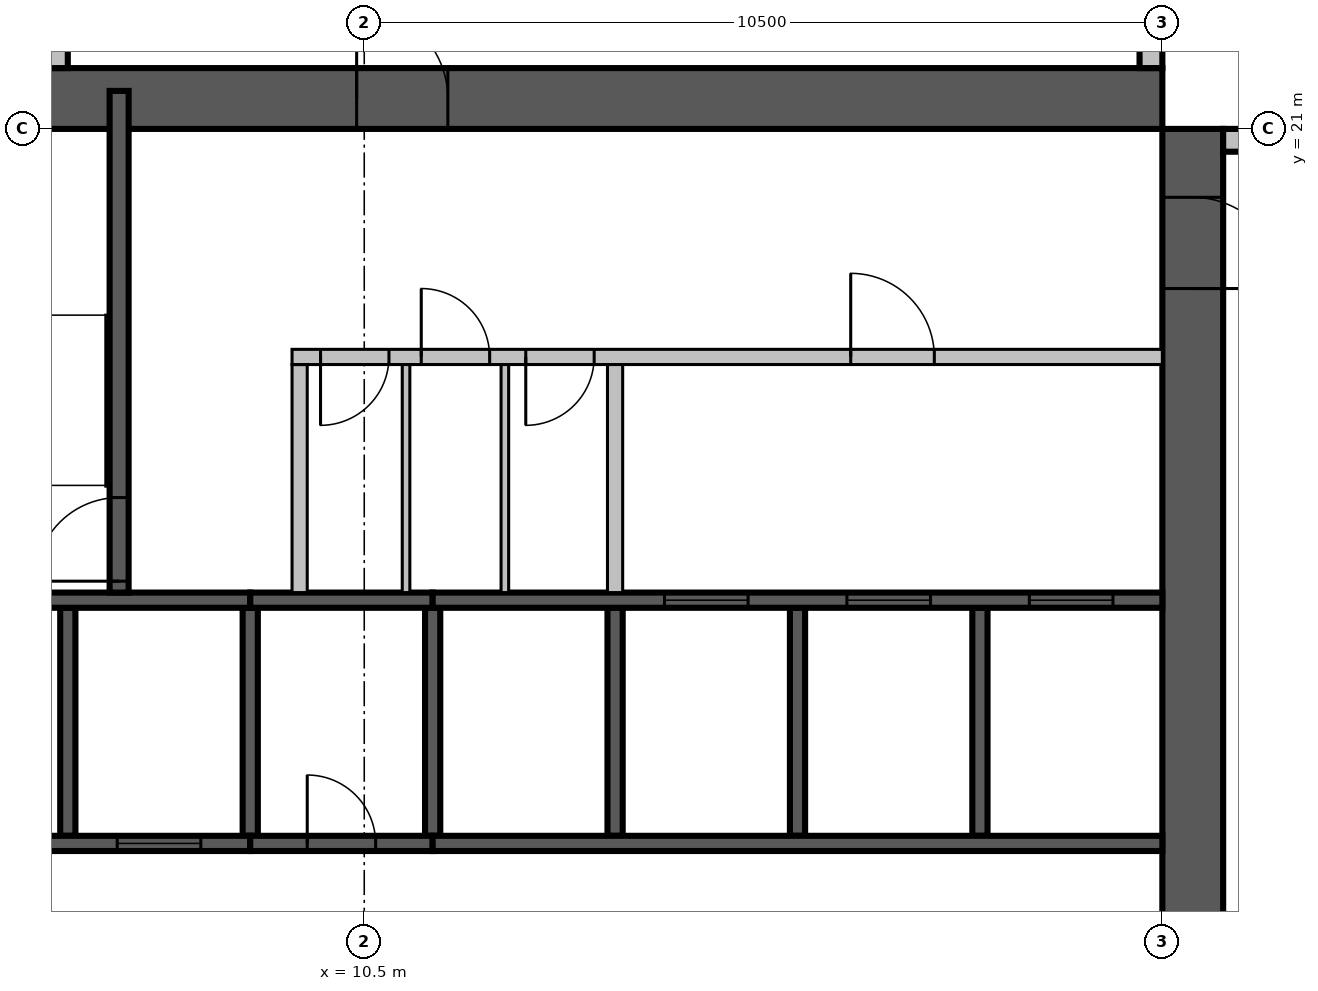
"""IFC4 building model, lengths in metres.
Left out: names, types, materials, properties, quantities, classifications, styles, units other than length and angle.
Written with IfcOpenShell. Run it as: python <this file> out.ifc"""

import sys

from ifc_helpers import new_model, si_unit, direction, frame, frame_2d, origin, place, context, subcontext, project, spatial, rectangle, extrude, source, transform, mapped, element, fill, save


model = new_model("IFC4")
c1 = context("Model", 3, precision=1e-05, world=origin(), true_north=direction((0.0, 1.0)))
c2 = subcontext(c1, "Body", "Model", "MODEL_VIEW")
j1 = project(units=[si_unit("LENGTHUNIT", "METRE"), si_unit("PLANEANGLEUNIT", "RADIAN")], contexts=[c1])
p1 = place(None, origin())
s1 = spatial("IfcSite", under=j1, at=p1, CompositionType="ELEMENT")
p2 = place(p1, origin())
s2 = spatial("IfcBuilding", under=s1, at=p2, CompositionType="ELEMENT")
p3 = place(p2, frame((0.0, 0.0, 265.2)))
s3 = spatial("IfcBuildingStorey", under=s2, at=p3, CompositionType="ELEMENT", Elevation=265.2)
m1 = source(origin(), c2, "Body", "SweptSolid", [
    extrude(rectangle(XDim=16.8, YDim=0.8, at=frame_2d((8.4, 0.0))), origin(), (0.0, 0.0, 1.0), 3.8),
])
p4 = place(p3, frame((21.4, 4.2, 0.0), z_axis=(0.0, 0.0, 1.0), x_axis=(0.0, 1.0, 0.0)))
e1 = element("IfcWall", 1, at=p4, inside=s3, PredefinedType="SHEAR", context=c2, shape_type="MappedRepresentation", body=[
    mapped(m1, transform((0.0, 0.0, 0.0), scale=1.0)),
])
m2 = source(origin(), c2, "Body", "SweptSolid", [
    extrude(rectangle(XDim=2.2, YDim=2.1, at=frame_2d((1.1, 1.05))), frame((0.0, 0.41, 0.0), z_axis=(0.0, -1.0, 0.0), x_axis=(1.0, 0.0, 0.0)), (0.0, 0.0, 1.0), 0.82),
])
p5 = place(p4, frame((4.2, 0.0, 0.0)))
e2 = element("IfcOpeningElement", 2, at=p5, cuts=e1, PredefinedType="OPENING", context=c2, shape_type="MappedRepresentation", body=[
    mapped(m2, transform((0.0, 0.0, 0.0), scale=1.0)),
])
m3 = source(origin(), c2, "Body", "SweptSolid", [
    extrude(rectangle(XDim=1.2, YDim=2.1, at=frame_2d((0.6, 1.05))), frame((0.0, 0.41, 0.0), z_axis=(0.0, -1.0, 0.0), x_axis=(1.0, 0.0, 0.0)), (0.0, 0.0, 1.0), 0.82),
])
p6 = place(p4, frame((14.7, 0.0, 0.0)))
e3 = element("IfcOpeningElement", 3, at=p6, cuts=e1, PredefinedType="OPENING", context=c2, shape_type="MappedRepresentation", body=[
    mapped(m3, transform((0.0, 0.0, 0.0), scale=1.0)),
])
p7 = place(p3, frame((4.2, 21.4, 0.0), z_axis=(0.0, 0.0, 1.0), x_axis=(1.0, 0.0, 0.0)))
e4 = element("IfcWall", 4, at=p7, inside=s3, PredefinedType="SHEAR", context=c2, shape_type="MappedRepresentation", body=[
    mapped(m1, transform((0.0, 0.0, 0.0), scale=1.0)),
])
p8 = place(p7, frame((6.2, 0.0, 0.0)))
e5 = element("IfcOpeningElement", 5, at=p8, cuts=e4, PredefinedType="OPENING", context=c2, shape_type="MappedRepresentation", body=[
    mapped(m3, transform((0.0, 0.0, 0.0), scale=1.0)),
])
m4 = source(origin(), c2, "Body", "SweptSolid", [
    extrude(rectangle(XDim=7.2, YDim=0.3, at=frame_2d((3.6, 0.0))), origin(), (0.0, 0.0, 1.0), 3.4),
])
p9 = place(p3, frame((29.0, 20.85, 0.0), z_axis=(0.0, 0.0, 1.0), x_axis=(-1.0, 0.0, 0.0)))
e6 = element("IfcWall", 6, at=p9, inside=s3, PredefinedType="STANDARD", context=c2, shape_type="MappedRepresentation", body=[
    mapped(m4, transform((0.0, 0.0, 0.0), scale=1.0)),
])
m5 = source(origin(), c2, "Body", "SweptSolid", [
    extrude(rectangle(XDim=1.8, YDim=2.3, at=frame_2d((0.9, 1.15))), frame((0.0, 0.16, 0.0), z_axis=(0.0, -1.0, 0.0), x_axis=(1.0, 0.0, 0.0)), (0.0, 0.0, 1.0), 0.32),
])
p10 = place(p9, frame((0.613, 0.0, 0.6)))
e7 = element("IfcOpeningElement", 7, at=p10, cuts=e6, PredefinedType="OPENING", context=c2, shape_type="MappedRepresentation", body=[
    mapped(m5, transform((0.0, 0.0, 0.0), scale=1.0)),
])
p11 = place(p9, frame((5.0, 0.0, 0.6)))
e8 = element("IfcOpeningElement", 8, at=p11, cuts=e6, PredefinedType="OPENING", context=c2, shape_type="MappedRepresentation", body=[
    mapped(m5, transform((0.0, 0.0, 0.0), scale=1.0)),
])
p12 = place(p3, frame((20.85, 21.8, 0.0), z_axis=(0.0, 0.0, 1.0), x_axis=(0.0, 1.0, 0.0)))
e9 = element("IfcWall", 9, at=p12, inside=s3, PredefinedType="STANDARD", context=c2, shape_type="MappedRepresentation", body=[
    mapped(m4, transform((0.0, 0.0, 0.0), scale=1.0)),
])
p13 = place(p12, frame((0.4, 0.0, 0.6)))
e10 = element("IfcOpeningElement", 10, at=p13, cuts=e9, PredefinedType="OPENING", context=c2, shape_type="MappedRepresentation", body=[
    mapped(m5, transform((0.0, 0.0, 0.0), scale=1.0)),
])
p14 = place(p12, frame((4.787, 0.0, 0.6)))
e11 = element("IfcOpeningElement", 11, at=p14, cuts=e9, PredefinedType="OPENING", context=c2, shape_type="MappedRepresentation", body=[
    mapped(m5, transform((0.0, 0.0, 0.0), scale=1.0)),
])
m6 = source(origin(), c2, "Body", "SweptSolid", [
    extrude(rectangle(XDim=16.6, YDim=0.3, at=frame_2d((8.3, 0.0))), origin(), (0.0, 0.0, 1.0), 3.4),
])
p15 = place(p3, frame((6.45, 38.4, 0.0), z_axis=(0.0, 0.0, 1.0), x_axis=(0.0, -1.0, 0.0)))
e12 = element("IfcWall", 12, at=p15, inside=s3, PredefinedType="STANDARD", context=c2, shape_type="MappedRepresentation", body=[
    mapped(m6, transform((0.0, 0.0, 0.0), scale=1.0)),
])
p16 = place(p15, frame((1.15, 0.0, 0.6)))
e13 = element("IfcOpeningElement", 13, at=p16, cuts=e12, PredefinedType="OPENING", context=c2, shape_type="MappedRepresentation", body=[
    mapped(m5, transform((0.0, 0.0, 0.0), scale=1.0)),
])
m7 = source(origin(), c2, "Body", "SweptSolid", [
    extrude(rectangle(XDim=2.4, YDim=2.3, at=frame_2d((1.2, 1.15))), frame((0.0, 0.16, 0.0), z_axis=(0.0, -1.0, 0.0), x_axis=(1.0, 0.0, 0.0)), (0.0, 0.0, 1.0), 0.32),
])
p17 = place(p15, frame((4.75, 0.0, 0.6)))
e14 = element("IfcOpeningElement", 14, at=p17, cuts=e12, PredefinedType="OPENING", context=c2, shape_type="MappedRepresentation", body=[
    mapped(m7, transform((0.0, 0.0, 0.0), scale=1.0)),
])
p18 = place(p15, frame((9.438, 0.0, 0.6)))
e15 = element("IfcOpeningElement", 15, at=p18, cuts=e12, PredefinedType="OPENING", context=c2, shape_type="MappedRepresentation", body=[
    mapped(m5, transform((0.0, 0.0, 0.0), scale=1.0)),
])
m8 = source(origin(), c2, "Body", "SweptSolid", [
    extrude(rectangle(XDim=3.0, YDim=2.3, at=frame_2d((1.5, 1.15))), frame((0.0, 0.16, 0.0), z_axis=(0.0, -1.0, 0.0), x_axis=(1.0, 0.0, 0.0)), (0.0, 0.0, 1.0), 0.32),
])
p19 = place(p15, frame((12.7, 0.0, 0.6)))
e16 = element("IfcOpeningElement", 16, at=p19, cuts=e12, PredefinedType="OPENING", context=c2, shape_type="MappedRepresentation", body=[
    mapped(m8, transform((0.0, 0.0, 0.0), scale=1.0)),
])
m9 = source(origin(), c2, "Body", "SweptSolid", [
    extrude(rectangle(XDim=3.0, YDim=0.2, at=frame_2d((1.5, 0.0))), origin(), (0.0, 0.0, 1.0), 3.8),
])
p20 = place(p3, frame((6.6, 11.7, 0.0), z_axis=(0.0, 0.0, 1.0), x_axis=(0.0, 1.0, 0.0)))
e17 = element("IfcWall", 17, at=p20, inside=s3, PredefinedType="SOLIDWALL", context=c2, shape_type="MappedRepresentation", body=[
    mapped(m9, transform((0.0, 0.0, 0.0), scale=1.0)),
])
m10 = source(origin(), c2, "Body", "SweptSolid", [
    extrude(rectangle(XDim=3.0, YDim=0.2, at=frame_2d((1.5, 0.0))), origin(), (0.0, 0.0, 1.0), 3.4),
])
for number, where, z_axis, x_axis in (
    (18, (9.0, 11.7, 0.0), (0.0, 0.0, 1.0), (0.0, 1.0, 0.0)),
    (19, (11.4, 11.7, 0.0), (0.0, 0.0, 1.0), (0.0, 1.0, 0.0)),
):
    element("IfcWall", number, at=place(p3, frame(where, z_axis=z_axis, x_axis=x_axis)), inside=s3, PredefinedType="SOLIDWALL", context=c2, shape_type="MappedRepresentation", body=[
        mapped(m10, transform((0.0, 0.0, 0.0), scale=1.0)),
    ])
for number, where, z_axis, x_axis in (
    (20, (13.8, 11.7, 0.0), (0.0, 0.0, 1.0), (0.0, 1.0, 0.0)),
    (21, (16.2, 11.7, 0.0), (0.0, 0.0, 1.0), (0.0, 1.0, 0.0)),
    (22, (18.6, 11.7, 0.0), (0.0, 0.0, 1.0), (0.0, 1.0, 0.0)),
):
    element("IfcWall", number, at=place(p3, frame(where, z_axis=z_axis, x_axis=x_axis)), inside=s3, PredefinedType="SOLIDWALL", context=c2, shape_type="MappedRepresentation", body=[
        mapped(m9, transform((0.0, 0.0, 0.0), scale=1.0)),
    ])
m11 = source(origin(), c2, "Body", "SweptSolid", [
    extrude(rectangle(XDim=4.8, YDim=0.2, at=frame_2d((2.4, 0.0))), origin(), (0.0, 0.0, 1.0), 3.8),
])
p21 = place(p3, frame((4.2, 11.6, 0.0), z_axis=(0.0, 0.0, 1.0), x_axis=(1.0, 0.0, 0.0)))
e23 = element("IfcWall", 23, at=p21, inside=s3, PredefinedType="SOLIDWALL", context=c2, shape_type="MappedRepresentation", body=[
    mapped(m11, transform((0.0, 0.0, 0.0), scale=1.0)),
])
m12 = source(origin(), c2, "Body", "SweptSolid", [
    extrude(rectangle(XDim=1.1, YDim=2.1, at=frame_2d((0.55, 1.05))), frame((0.0, 0.11, 0.0), z_axis=(0.0, -1.0, 0.0), x_axis=(1.0, 0.0, 0.0)), (0.0, 0.0, 1.0), 0.22),
])
p22 = place(p21, frame((0.65, 0.0, 0.0)))
e24 = element("IfcOpeningElement", 24, at=p22, cuts=e23, PredefinedType="OPENING", context=c2, shape_type="MappedRepresentation", body=[
    mapped(m12, transform((0.0, 0.0, 0.0), scale=1.0)),
])
p23 = place(p21, frame((3.05, 0.0, 0.0)))
e25 = element("IfcOpeningElement", 25, at=p23, cuts=e23, PredefinedType="OPENING", context=c2, shape_type="MappedRepresentation", body=[
    mapped(m12, transform((0.0, 0.0, 0.0), scale=1.0)),
])
m13 = source(origin(), c2, "Body", "SweptSolid", [
    extrude(rectangle(XDim=2.4, YDim=0.2, at=frame_2d((1.2, 0.0))), origin(), (0.0, 0.0, 1.0), 3.4),
])
p24 = place(p3, frame((9.0, 11.6, 0.0), z_axis=(0.0, 0.0, 1.0), x_axis=(1.0, 0.0, 0.0)))
e26 = element("IfcWall", 26, at=p24, inside=s3, PredefinedType="SOLIDWALL", context=c2, shape_type="MappedRepresentation", body=[
    mapped(m13, transform((0.0, 0.0, 0.0), scale=1.0)),
])
m14 = source(origin(), c2, "Body", "SweptSolid", [
    extrude(rectangle(XDim=0.9, YDim=2.1, at=frame_2d((0.45, 1.05))), frame((0.0, 0.11, 0.0), z_axis=(0.0, -1.0, 0.0), x_axis=(1.0, 0.0, 0.0)), (0.0, 0.0, 1.0), 0.22),
])
p25 = place(p24, frame((0.75, 0.0, 0.0)))
e27 = element("IfcOpeningElement", 27, at=p25, cuts=e26, PredefinedType="OPENING", context=c2, shape_type="MappedRepresentation", body=[
    mapped(m14, transform((0.0, 0.0, 0.0), scale=1.0)),
])
m15 = source(origin(), c2, "Body", "SweptSolid", [
    extrude(rectangle(XDim=9.6, YDim=0.2, at=frame_2d((4.8, 0.0))), origin(), (0.0, 0.0, 1.0), 3.8),
])
p26 = place(p3, frame((11.4, 11.6, 0.0), z_axis=(0.0, 0.0, 1.0), x_axis=(1.0, 0.0, 0.0)))
e28 = element("IfcWall", 28, at=p26, inside=s3, PredefinedType="SOLIDWALL", context=c2, shape_type="MappedRepresentation", body=[
    mapped(m15, transform((0.0, 0.0, 0.0), scale=1.0)),
])
p27 = place(p3, frame((4.2, 14.8, 0.0), z_axis=(0.0, 0.0, 1.0), x_axis=(1.0, 0.0, 0.0)))
e29 = element("IfcWall", 29, at=p27, inside=s3, PredefinedType="SOLIDWALL", context=c2, shape_type="MappedRepresentation", body=[
    mapped(m11, transform((0.0, 0.0, 0.0), scale=1.0)),
])
p28 = place(p3, frame((9.0, 14.8, 0.0), z_axis=(0.0, 0.0, 1.0), x_axis=(1.0, 0.0, 0.0)))
e30 = element("IfcWall", 30, at=p28, inside=s3, PredefinedType="SOLIDWALL", context=c2, shape_type="MappedRepresentation", body=[
    mapped(m13, transform((0.0, 0.0, 0.0), scale=1.0)),
])
p29 = place(p3, frame((11.4, 14.8, 0.0), z_axis=(0.0, 0.0, 1.0), x_axis=(1.0, 0.0, 0.0)))
e31 = element("IfcWall", 31, at=p29, inside=s3, PredefinedType="SOLIDWALL", context=c2, shape_type="MappedRepresentation", body=[
    mapped(m15, transform((0.0, 0.0, 0.0), scale=1.0)),
])
p30 = place(p29, frame((3.05, 0.0, 0.0)))
e32 = element("IfcOpeningElement", 32, at=p30, cuts=e31, PredefinedType="OPENING", context=c2, shape_type="MappedRepresentation", body=[
    mapped(m12, transform((0.0, 0.0, 0.0), scale=1.0)),
])
p31 = place(p29, frame((5.45, 0.0, 0.0)))
e33 = element("IfcOpeningElement", 33, at=p31, cuts=e31, PredefinedType="OPENING", context=c2, shape_type="MappedRepresentation", body=[
    mapped(m12, transform((0.0, 0.0, 0.0), scale=1.0)),
])
p32 = place(p29, frame((7.85, 0.0, 0.0)))
e34 = element("IfcOpeningElement", 34, at=p32, cuts=e31, PredefinedType="OPENING", context=c2, shape_type="MappedRepresentation", body=[
    mapped(m12, transform((0.0, 0.0, 0.0), scale=1.0)),
])
m16 = source(origin(), c2, "Body", "SweptSolid", [
    extrude(rectangle(XDim=6.6, YDim=0.25, at=frame_2d((3.3, 0.0))), origin(), (0.0, 0.0, 1.0), 3.4),
])
p33 = place(p3, frame((7.275, 14.9, 0.0), z_axis=(0.0, 0.0, 1.0), x_axis=(0.0, 1.0, 0.0)))
e35 = element("IfcWall", 35, at=p33, inside=s3, PredefinedType="SOLIDWALL", context=c2, shape_type="MappedRepresentation", body=[
    mapped(m16, transform((0.0, 0.0, 0.0), scale=1.0)),
])
m17 = source(origin(), c2, "Body", "SweptSolid", [
    extrude(rectangle(XDim=1.1, YDim=2.1, at=frame_2d((0.55, 1.05))), frame((0.0, 0.135, 0.0), z_axis=(0.0, -1.0, 0.0), x_axis=(1.0, 0.0, 0.0)), (0.0, 0.0, 1.0), 0.27),
])
p34 = place(p33, frame((0.15, 0.0, 0.0)))
e36 = element("IfcOpeningElement", 36, at=p34, cuts=e35, PredefinedType="OPENING", context=c2, shape_type="MappedRepresentation", body=[
    mapped(m17, transform((0.0, 0.0, 0.0), scale=1.0)),
])
m18 = source(origin(), c2, "Body", "SweptSolid", [
    extrude(rectangle(XDim=3.0, YDim=0.2, at=frame_2d((1.5, 0.0))), origin(), (0.0, 0.0, 1.0), 3.4),
])
p35 = place(p3, frame((9.65, 14.9, 0.0), z_axis=(0.0, 0.0, 1.0), x_axis=(0.0, 1.0, 0.0)))
e37 = element("IfcWall", 37, at=p35, inside=s3, PredefinedType="PARTITIONING", context=c2, shape_type="MappedRepresentation", body=[
    mapped(m18, transform((0.0, 0.0, 0.0), scale=1.0)),
])
m19 = source(origin(), c2, "Body", "SweptSolid", [
    extrude(rectangle(XDim=11.45, YDim=0.2, at=frame_2d((5.725, 0.0))), origin(), (0.0, 0.0, 1.0), 3.4),
])
p36 = place(p3, frame((9.55, 18.0, 0.0), z_axis=(0.0, 0.0, 1.0), x_axis=(1.0, 0.0, 0.0)))
e38 = element("IfcWall", 38, at=p36, inside=s3, PredefinedType="PARTITIONING", context=c2, shape_type="MappedRepresentation", body=[
    mapped(m19, transform((0.0, 0.0, 0.0), scale=1.0)),
])
p37 = place(p36, frame((0.375, 0.0, 0.0)))
e39 = element("IfcOpeningElement", 39, at=p37, cuts=e38, PredefinedType="OPENING", context=c2, shape_type="MappedRepresentation", body=[
    mapped(m14, transform((0.0, 0.0, 0.0), scale=1.0)),
])
p38 = place(p36, frame((1.7, 0.0, 0.0)))
e40 = element("IfcOpeningElement", 40, at=p38, cuts=e38, PredefinedType="OPENING", context=c2, shape_type="MappedRepresentation", body=[
    mapped(m14, transform((0.0, 0.0, 0.0), scale=1.0)),
])
p39 = place(p36, frame((3.075, 0.0, 0.0)))
e41 = element("IfcOpeningElement", 41, at=p39, cuts=e38, PredefinedType="OPENING", context=c2, shape_type="MappedRepresentation", body=[
    mapped(m14, transform((0.0, 0.0, 0.0), scale=1.0)),
])
p40 = place(p36, frame((7.35, 0.0, 0.0)))
e42 = element("IfcOpeningElement", 42, at=p40, cuts=e38, PredefinedType="OPENING", context=c2, shape_type="MappedRepresentation", body=[
    mapped(m12, transform((0.0, 0.0, 0.0), scale=1.0)),
])
p41 = place(p3, frame((13.8, 14.9, 0.0), z_axis=(0.0, 0.0, 1.0), x_axis=(0.0, 1.0, 0.0)))
e43 = element("IfcWall", 43, at=p41, inside=s3, PredefinedType="PARTITIONING", context=c2, shape_type="MappedRepresentation", body=[
    mapped(m18, transform((0.0, 0.0, 0.0), scale=1.0)),
])
m20 = source(origin(), c2, "Body", "SweptSolid", [
    extrude(rectangle(XDim=3.0, YDim=0.1, at=frame_2d((1.5, 0.0))), origin(), (0.0, 0.0, 1.0), 3.4),
])
for number, where, z_axis, x_axis in (
    (44, (11.05, 14.9, 0.0), (0.0, 0.0, 1.0), (0.0, 1.0, 0.0)),
    (45, (12.35, 14.9, 0.0), (0.0, 0.0, 1.0), (0.0, 1.0, 0.0)),
):
    element("IfcWall", number, at=place(p3, frame(where, z_axis=z_axis, x_axis=x_axis)), inside=s3, PredefinedType="PARTITIONING", context=c2, shape_type="MappedRepresentation", body=[
        mapped(m20, transform((0.0, 0.0, 0.0), scale=1.0)),
    ])
m21 = source(origin(), c2, "Body", "SweptSolid", [
    extrude(rectangle(XDim=1.1, YDim=2.1, at=frame_2d((0.55, 1.05))), frame((0.0, 0.025, 0.0), z_axis=(0.0, -1.0, 0.0), x_axis=(1.0, 0.0, 0.0)), (0.0, 0.0, 1.0), 0.05),
])
p42 = place(p23, origin())
e46 = element("IfcDoor", 46, at=p42, inside=s3, OperationType="SLIDING_TO_LEFT", PredefinedType="DOOR", context=c2, shape_type="MappedRepresentation", body=[
    mapped(m21, transform((0.0, 0.0, 0.0), scale=1.0)),
])
fill(e25, e46)
m22 = source(origin(), c2, "Body", "SweptSolid", [
    extrude(rectangle(XDim=0.9, YDim=2.1, at=frame_2d((0.45, 1.05))), frame((0.0, 0.025, 0.0), z_axis=(0.0, -1.0, 0.0), x_axis=(1.0, 0.0, 0.0)), (0.0, 0.0, 1.0), 0.05),
])
p43 = place(p25, origin())
e47 = element("IfcDoor", 47, at=p43, inside=s3, OperationType="SINGLE_SWING_LEFT", PredefinedType="DOOR", context=c2, shape_type="MappedRepresentation", body=[
    mapped(m22, transform((0.0, 0.0, 0.0), scale=1.0)),
])
fill(e27, e47)
p44 = place(p30, origin())
e48 = element("IfcDoor", 48, at=p44, inside=s3, OperationType="SLIDING_TO_LEFT", PredefinedType="DOOR", context=c2, shape_type="MappedRepresentation", body=[
    mapped(m21, transform((0.0, 0.0, 0.0), scale=1.0)),
])
fill(e32, e48)
p45 = place(p31, origin())
e49 = element("IfcDoor", 49, at=p45, inside=s3, OperationType="SLIDING_TO_LEFT", PredefinedType="DOOR", context=c2, shape_type="MappedRepresentation", body=[
    mapped(m21, transform((0.0, 0.0, 0.0), scale=1.0)),
])
fill(e33, e49)
p46 = place(p32, origin())
e50 = element("IfcDoor", 50, at=p46, inside=s3, OperationType="SLIDING_TO_LEFT", PredefinedType="DOOR", context=c2, shape_type="MappedRepresentation", body=[
    mapped(m21, transform((0.0, 0.0, 0.0), scale=1.0)),
])
fill(e34, e50)
p47 = place(p34, origin())
e51 = element("IfcDoor", 51, at=p47, inside=s3, OperationType="SINGLE_SWING_LEFT", PredefinedType="DOOR", context=c2, shape_type="MappedRepresentation", body=[
    mapped(m21, transform((0.0, 0.0, 0.0), scale=1.0)),
])
fill(e36, e51)
p48 = place(p37, origin())
e52 = element("IfcDoor", 52, at=p48, inside=s3, OperationType="SINGLE_SWING_RIGHT", PredefinedType="DOOR", context=c2, shape_type="MappedRepresentation", body=[
    mapped(m22, transform((0.0, 0.0, 0.0), scale=1.0)),
])
fill(e39, e52)
p49 = place(p38, origin())
e53 = element("IfcDoor", 53, at=p49, inside=s3, OperationType="SINGLE_SWING_LEFT", PredefinedType="DOOR", context=c2, shape_type="MappedRepresentation", body=[
    mapped(m22, transform((0.0, 0.0, 0.0), scale=1.0)),
])
fill(e40, e53)
p50 = place(p39, origin())
e54 = element("IfcDoor", 54, at=p50, inside=s3, OperationType="SINGLE_SWING_RIGHT", PredefinedType="DOOR", context=c2, shape_type="MappedRepresentation", body=[
    mapped(m22, transform((0.0, 0.0, 0.0), scale=1.0)),
])
fill(e41, e54)
p51 = place(p40, origin())
e55 = element("IfcDoor", 55, at=p51, inside=s3, OperationType="SINGLE_SWING_LEFT", PredefinedType="DOOR", context=c2, shape_type="MappedRepresentation", body=[
    mapped(m21, transform((0.0, 0.0, 0.0), scale=1.0)),
])
fill(e42, e55)
m23 = source(origin(), c2, "Body", "SweptSolid", [
    extrude(rectangle(XDim=1.2, YDim=2.1, at=frame_2d((0.6, 1.05))), frame((0.0, 0.025, 0.0), z_axis=(0.0, -1.0, 0.0), x_axis=(1.0, 0.0, 0.0)), (0.0, 0.0, 1.0), 0.05),
])
p52 = place(p8, origin())
e56 = element("IfcDoor", 56, at=p52, inside=s3, OperationType="SINGLE_SWING_LEFT", PredefinedType="DOOR", context=c2, shape_type="MappedRepresentation", body=[
    mapped(m23, transform((0.0, 0.0, 0.0), scale=1.0)),
])
fill(e5, e56)
p53 = place(p6, origin())
e57 = element("IfcDoor", 57, at=p53, inside=s3, OperationType="SINGLE_SWING_RIGHT", PredefinedType="DOOR", context=c2, shape_type="MappedRepresentation", body=[
    mapped(m23, transform((0.0, 0.0, 0.0), scale=1.0)),
])
fill(e3, e57)
save(model, sys.argv[1])
